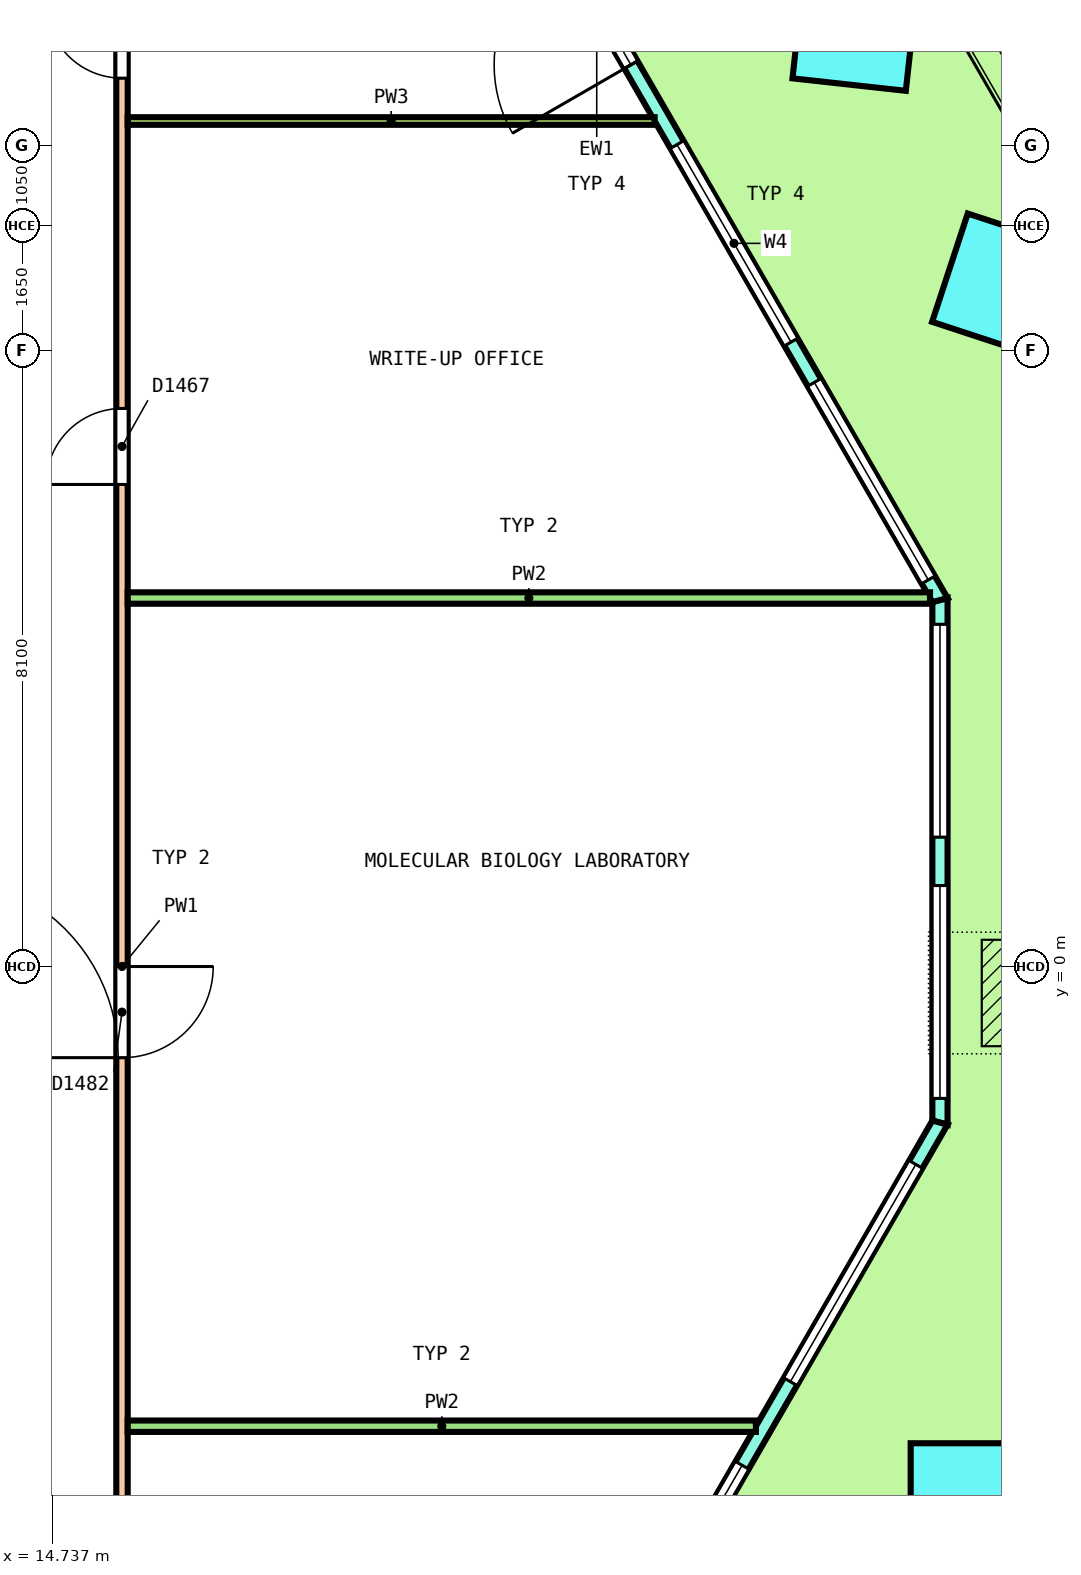
"""IFC4 building model, lengths in metres.
Left out: names, types, materials, properties, quantities, classifications, styles, units other than length and angle.
Written with IfcOpenShell. Run it as: python <this file> out.ifc"""

import sys

from ifc_helpers import new_model, si_unit, direction, frame, frame_2d, origin, origin_2d, place, context, subcontext, project, spatial, polyline, rectangle, outline, extrude, element, fill, save


model = new_model("IFC4")
c1 = context("Model", 3, precision=1e-05, world=origin(), true_north=direction((0.0, 1.0)))
c2 = subcontext(c1, "Body", "Model", "MODEL_VIEW")
j1 = project(units=[si_unit("LENGTHUNIT", "METRE"), si_unit("PLANEANGLEUNIT", "RADIAN")], contexts=[c1])
p1 = place(None, origin())
s1 = spatial("IfcSite", under=j1, at=p1, CompositionType="ELEMENT")
p2 = place(p1, origin())
s2 = spatial("IfcBuilding", under=s1, at=p2, CompositionType="ELEMENT")
p3 = place(p2, frame((0.0, 0.0, 67.4)))
s3 = spatial("IfcBuildingStorey", under=s2, at=p3, CompositionType="ELEMENT", Elevation=67.4)
p4 = place(p3, frame((27.255, 8.959, 0.0), z_axis=(-0.206604255639, -0.238543908815, 0.948900144967), x_axis=(-0.524107453988, 0.845931636481, 0.098544624791)))
e1 = element("IfcColumn", 1, at=p4, inside=s3, PredefinedType="COLUMN", context=c2, shape_type="SweptSolid", body=[
    extrude(rectangle(XDim=1.5, YDim=1.5, at=origin_2d()), origin(), (0.0, 0.0, 1.0), 4.258),
])
p5 = place(p3, frame((25.299, 12.347, 0.0), z_axis=(-0.242216248762, -0.179760869681, 0.953423997268), x_axis=(-0.508552704351, 0.860397321393, 0.033024176556)))
e2 = element("IfcColumn", 2, at=p5, inside=s3, PredefinedType="COLUMN", context=c2, shape_type="SweptSolid", body=[
    extrude(rectangle(XDim=1.5, YDim=1.5, at=origin_2d()), origin(), (0.0, 0.0, 1.0), 4.237),
])
p6 = place(p3, frame((26.776, -7.023, 0.0), z_axis=(-0.106402456539, -0.184226228858, 0.977107575369), x_axis=(0.488665296242, 0.846135593228, 0.212745825157)))
e3 = element("IfcColumn", 3, at=p6, inside=s3, PredefinedType="COLUMN", context=c2, shape_type="SweptSolid", body=[
    extrude(rectangle(XDim=1.5, YDim=1.5, at=origin_2d()), origin(), (0.0, 0.0, 1.0), 4.135),
])
p7 = place(p3, frame((26.411, -2.055, 0.0), z_axis=(0.0, 0.0, 1.0), x_axis=(0.0, 1.0, 0.0)))
e4 = element("IfcWall", 4, at=p7, inside=s3, PredefinedType="SOLIDWALL", context=c2, shape_type="SweptSolid", body=[
    extrude(outline(polyline([(-0.027, -0.1), (1.128, -0.1), (2.283, -0.1), (3.438, -0.1), (4.592, -0.1), (5.747, -0.1), (6.902, -0.1), (6.848, 0.1), (5.711, 0.1), (4.574, 0.1), (3.438, 0.1), (2.301, 0.1), (1.164, 0.1), (0.027, 0.1), (-0.027, -0.1)])), origin(), (0.0, 0.0, 1.0), 4.1),
])
p8 = place(p7, frame((0.319, 0.0, 0.1)))
e5 = element("IfcOpeningElement", 5, at=p8, cuts=e4, PredefinedType="OPENING", context=c2, shape_type="SweptSolid", body=[
    extrude(rectangle(XDim=2.8, YDim=2.9, at=frame_2d((1.4, 1.45))), frame((0.0, 0.11, 0.0), z_axis=(0.0, -1.0, 0.0), x_axis=(1.0, 0.0, 0.0)), (0.0, 0.0, 1.0), 0.22),
])
p9 = place(p7, frame((3.756, 0.0, 0.1)))
e6 = element("IfcOpeningElement", 6, at=p9, cuts=e4, PredefinedType="OPENING", context=c2, shape_type="SweptSolid", body=[
    extrude(rectangle(XDim=2.8, YDim=2.9, at=frame_2d((1.4, 1.45))), frame((0.0, 0.11, 0.0), z_axis=(0.0, -1.0, 0.0), x_axis=(1.0, 0.0, 0.0)), (0.0, 0.0, 1.0), 0.22),
])
p10 = place(p3, frame((26.411, 4.82, 0.0), z_axis=(0.0, 0.0, 1.0), x_axis=(-0.500000137386, 0.866025324465, 0.0)))
e7 = element("IfcWall", 7, at=p10, inside=s3, PredefinedType="SOLIDWALL", context=c2, shape_type="SweptSolid", body=[
    extrude(outline(polyline([(-0.027, -0.1), (0.979, -0.1), (1.986, -0.1), (2.992, -0.1), (3.999, -0.1), (5.005, -0.1), (6.012, -0.1), (7.018, -0.1), (8.025, -0.1), (9.031, -0.1), (10.038, -0.1), (11.044, -0.1), (12.051, -0.1), (13.057, -0.1), (14.063, -0.1), (15.07, -0.1), (16.076, -0.1), (17.083, -0.1), (18.089, -0.1), (18.036, 0.1), (17.035, 0.1), (16.035, 0.1), (15.034, 0.1), (14.034, 0.1), (13.033, 0.1), (12.033, 0.1), (11.032, 0.1), (10.032, 0.1), (9.031, 0.1), (8.031, 0.1), (7.03, 0.1), (6.03, 0.1), (5.029, 0.1), (4.029, 0.1), (3.028, 0.1), (2.028, 0.1), (1.027, 0.1), (0.027, 0.1), (-0.027, -0.1)])), origin(), (0.0, 0.0, 1.0), 4.1),
])
p11 = place(p10, frame((0.306, 0.0, 0.1)))
e8 = element("IfcOpeningElement", 8, at=p11, cuts=e7, PredefinedType="OPENING", context=c2, shape_type="SweptSolid", body=[
    extrude(rectangle(XDim=3.0, YDim=2.9, at=frame_2d((1.5, 1.45))), frame((0.0, 0.11, 0.0), z_axis=(0.0, -1.0, 0.0), x_axis=(1.0, 0.0, 0.0)), (0.0, 0.0, 1.0), 0.22),
])
p12 = place(p10, frame((3.919, 0.0, 0.1)))
e9 = element("IfcOpeningElement", 9, at=p12, cuts=e7, PredefinedType="OPENING", context=c2, shape_type="SweptSolid", body=[
    extrude(rectangle(XDim=3.0, YDim=2.9, at=frame_2d((1.5, 1.45))), frame((0.0, 0.11, 0.0), z_axis=(0.0, -1.0, 0.0), x_axis=(1.0, 0.0, 0.0)), (0.0, 0.0, 1.0), 0.22),
])
p13 = place(p10, frame((8.131, 0.0, 0.0)))
e10 = element("IfcOpeningElement", 10, at=p13, cuts=e7, PredefinedType="OPENING", context=c2, shape_type="SweptSolid", body=[
    extrude(rectangle(XDim=1.8, YDim=2.4, at=frame_2d((0.9, 1.2))), frame((0.0, 0.11, 0.0), z_axis=(0.0, -1.0, 0.0), x_axis=(1.0, 0.0, 0.0)), (0.0, 0.0, 1.0), 0.22),
])
p14 = place(p10, frame((8.131, 0.0, 2.55)))
e11 = element("IfcOpeningElement", 11, at=p14, cuts=e7, PredefinedType="OPENING", context=c2, shape_type="SweptSolid", body=[
    extrude(rectangle(XDim=1.8, YDim=0.45, at=frame_2d((0.9, 0.225))), frame((0.0, 0.11, 0.0), z_axis=(0.0, -1.0, 0.0), x_axis=(1.0, 0.0, 0.0)), (0.0, 0.0, 1.0), 0.22),
])
p15 = place(p10, frame((11.144, 0.0, 0.1)))
e12 = element("IfcOpeningElement", 12, at=p15, cuts=e7, PredefinedType="OPENING", context=c2, shape_type="SweptSolid", body=[
    extrude(rectangle(XDim=3.0, YDim=2.9, at=frame_2d((1.5, 1.45))), frame((0.0, 0.11, 0.0), z_axis=(0.0, -1.0, 0.0), x_axis=(1.0, 0.0, 0.0)), (0.0, 0.0, 1.0), 0.22),
])
p16 = place(p10, frame((14.756, 0.0, 0.1)))
e13 = element("IfcOpeningElement", 13, at=p16, cuts=e7, PredefinedType="OPENING", context=c2, shape_type="SweptSolid", body=[
    extrude(rectangle(XDim=3.0, YDim=2.9, at=frame_2d((1.5, 1.45))), frame((0.0, 0.11, 0.0), z_axis=(0.0, -1.0, 0.0), x_axis=(1.0, 0.0, 0.0)), (0.0, 0.0, 1.0), 0.22),
])
p17 = place(p3, frame((14.985, -21.845, 0.0), z_axis=(0.0, 0.0, 1.0), x_axis=(0.50000204422, 0.86602422355, 0.0)))
e14 = element("IfcWall", 14, at=p17, inside=s3, PredefinedType="SOLIDWALL", context=c2, shape_type="SweptSolid", body=[
    extrude(outline(polyline([(-0.027, -0.1), (1.014, -0.1), (2.055, -0.1), (3.097, -0.1), (4.138, -0.1), (5.179, -0.1), (6.22, -0.1), (7.261, -0.1), (8.303, -0.1), (9.344, -0.1), (10.385, -0.1), (11.426, -0.1), (12.468, -0.1), (13.509, -0.1), (14.55, -0.1), (15.591, -0.1), (16.632, -0.1), (17.673, -0.1), (18.715, -0.1), (19.756, -0.1), (20.797, -0.1), (21.838, -0.1), (22.879, -0.1), (22.826, 0.1), (21.789, 0.1), (20.753, 0.1), (19.717, 0.1), (18.68, 0.1), (17.644, 0.1), (16.608, 0.1), (15.572, 0.1), (14.535, 0.1), (13.499, 0.1), (12.463, 0.1), (11.426, 0.1), (10.39, 0.1), (9.354, 0.1), (8.317, 0.1), (7.281, 0.1), (6.245, 0.1), (5.208, 0.1), (4.172, 0.1), (3.136, 0.1), (2.099, 0.1), (1.063, 0.1), (0.027, 0.1), (-0.027, -0.1)])), origin(), (0.0, 0.0, 1.0), 4.1),
])
p18 = place(p17, frame((0.635, 0.0, 0.1)))
e15 = element("IfcOpeningElement", 15, at=p18, cuts=e14, PredefinedType="OPENING", context=c2, shape_type="SweptSolid", body=[
    extrude(rectangle(XDim=3.3, YDim=2.9, at=frame_2d((1.65, 1.45))), frame((0.0, 0.11, 0.0), z_axis=(0.0, -1.0, 0.0), x_axis=(1.0, 0.0, 0.0)), (0.0, 0.0, 1.0), 0.22),
])
p19 = place(p17, frame((5.206, 0.0, 0.1)))
e16 = element("IfcOpeningElement", 16, at=p19, cuts=e14, PredefinedType="OPENING", context=c2, shape_type="SweptSolid", body=[
    extrude(rectangle(XDim=3.3, YDim=2.9, at=frame_2d((1.65, 1.45))), frame((0.0, 0.11, 0.0), z_axis=(0.0, -1.0, 0.0), x_axis=(1.0, 0.0, 0.0)), (0.0, 0.0, 1.0), 0.22),
])
p20 = place(p17, frame((10.526, 0.0, 0.0)))
e17 = element("IfcOpeningElement", 17, at=p20, cuts=e14, PredefinedType="OPENING", context=c2, shape_type="SweptSolid", body=[
    extrude(rectangle(XDim=1.8, YDim=2.4, at=frame_2d((0.9, 1.2))), frame((0.0, 0.11, 0.0), z_axis=(0.0, -1.0, 0.0), x_axis=(1.0, 0.0, 0.0)), (0.0, 0.0, 1.0), 0.22),
])
p21 = place(p17, frame((10.526, 0.0, 2.55)))
e18 = element("IfcOpeningElement", 18, at=p21, cuts=e14, PredefinedType="OPENING", context=c2, shape_type="SweptSolid", body=[
    extrude(rectangle(XDim=1.8, YDim=0.45, at=frame_2d((0.9, 0.225))), frame((0.0, 0.11, 0.0), z_axis=(0.0, -1.0, 0.0), x_axis=(1.0, 0.0, 0.0)), (0.0, 0.0, 1.0), 0.22),
])
p22 = place(p17, frame((14.347, 0.0, 0.1)))
e19 = element("IfcOpeningElement", 19, at=p22, cuts=e14, PredefinedType="OPENING", context=c2, shape_type="SweptSolid", body=[
    extrude(rectangle(XDim=3.3, YDim=2.9, at=frame_2d((1.65, 1.45))), frame((0.0, 0.11, 0.0), z_axis=(0.0, -1.0, 0.0), x_axis=(1.0, 0.0, 0.0)), (0.0, 0.0, 1.0), 0.22),
])
p23 = place(p17, frame((18.917, 0.0, 0.1)))
e20 = element("IfcOpeningElement", 20, at=p23, cuts=e14, PredefinedType="OPENING", context=c2, shape_type="SweptSolid", body=[
    extrude(rectangle(XDim=3.3, YDim=2.9, at=frame_2d((1.65, 1.45))), frame((0.0, 0.11, 0.0), z_axis=(0.0, -1.0, 0.0), x_axis=(1.0, 0.0, 0.0)), (0.0, 0.0, 1.0), 0.22),
])
p24 = place(p3, frame((15.65, -13.175, 0.0), z_axis=(0.0, 0.0, 1.0), x_axis=(0.0, 1.0, 0.0)))
e21 = element("IfcWall", 21, at=p24, inside=s3, PredefinedType="PARTITIONING", context=c2, shape_type="SweptSolid", body=[
    extrude(rectangle(XDim=26.35, YDim=0.15, at=frame_2d((13.175, 0.0))), origin(), (0.0, 0.0, 1.0), 3.05),
])
p25 = place(p24, frame((19.516, 0.0, 0.0)))
e22 = element("IfcOpeningElement", 22, at=p25, cuts=e21, PredefinedType="OPENING", context=c2, shape_type="SweptSolid", body=[
    extrude(rectangle(XDim=1.0, YDim=2.1, at=frame_2d((0.5, 1.05))), frame((0.0, 0.085, 0.0), z_axis=(0.0, -1.0, 0.0), x_axis=(1.0, 0.0, 0.0)), (0.0, 0.0, 1.0), 0.17),
])
p26 = place(p24, frame((24.861, 0.0, 0.0)))
e23 = element("IfcOpeningElement", 23, at=p26, cuts=e21, PredefinedType="OPENING", context=c2, shape_type="SweptSolid", body=[
    extrude(rectangle(XDim=1.0, YDim=2.1, at=frame_2d((0.5, 1.05))), frame((0.0, 0.085, 0.0), z_axis=(0.0, -1.0, 0.0), x_axis=(1.0, 0.0, 0.0)), (0.0, 0.0, 1.0), 0.17),
])
p27 = place(p24, frame((3.851, 0.0, 0.0)))
e24 = element("IfcOpeningElement", 24, at=p27, cuts=e21, PredefinedType="OPENING", context=c2, shape_type="SweptSolid", body=[
    extrude(rectangle(XDim=1.0, YDim=2.1, at=frame_2d((0.5, 1.05))), frame((0.0, 0.085, 0.0), z_axis=(0.0, -1.0, 0.0), x_axis=(1.0, 0.0, 0.0)), (0.0, 0.0, 1.0), 0.17),
])
p28 = place(p24, frame((11.974, 0.0, 0.0)))
e25 = element("IfcOpeningElement", 25, at=p28, cuts=e21, PredefinedType="OPENING", context=c2, shape_type="SweptSolid", body=[
    extrude(rectangle(XDim=1.2, YDim=2.1, at=frame_2d((0.6, 1.05))), frame((0.0, 0.085, 0.0), z_axis=(0.0, -1.0, 0.0), x_axis=(1.0, 0.0, 0.0)), (0.0, 0.0, 1.0), 0.17),
])
p29 = place(p3, frame((15.725, 4.847, 0.0), z_axis=(0.0, 0.0, 1.0), x_axis=(1.0, 0.0, 0.0)))
e26 = element("IfcWall", 26, at=p29, inside=s3, PredefinedType="PARTITIONING", context=c2, shape_type="SweptSolid", body=[
    extrude(rectangle(XDim=10.555, YDim=0.15, at=frame_2d((5.278, 0.0))), origin(), (0.0, 0.0, 1.0), 3.05),
])
p30 = place(p3, frame((15.725, -6.049, 0.0), z_axis=(0.0, 0.0, 1.0), x_axis=(1.0, 0.0, 0.0)))
e27 = element("IfcWall", 27, at=p30, inside=s3, PredefinedType="PARTITIONING", context=c2, shape_type="SweptSolid", body=[
    extrude(rectangle(XDim=8.264, YDim=0.15, at=frame_2d((4.132, 0.0))), origin(), (0.0, 0.0, 1.0), 3.05),
])
p31 = place(p3, frame((15.725, 11.123, 0.0), z_axis=(0.0, 0.0, 1.0), x_axis=(1.0, 0.0, 0.0)))
e28 = element("IfcWall", 28, at=p31, inside=s3, PredefinedType="PARTITIONING", context=c2, shape_type="SweptSolid", body=[
    extrude(rectangle(XDim=6.932, YDim=0.1, at=frame_2d((3.466, 0.0))), origin(), (0.0, 0.0, 1.0), 3.05),
])
p32 = place(p8, origin())
e29 = element("IfcWindow", 29, at=p32, inside=s3, PartitioningType="SINGLE_PANEL", PredefinedType="WINDOW", context=c2, shape_type="SweptSolid", body=[
    extrude(rectangle(XDim=2.8, YDim=2.9, at=frame_2d((1.4, 1.45))), frame((0.0, 0.03, 0.0), z_axis=(0.0, -1.0, 0.0), x_axis=(1.0, 0.0, 0.0)), (0.0, 0.0, 1.0), 0.06),
])
fill(e5, e29)
p33 = place(p9, origin())
e30 = element("IfcWindow", 30, at=p33, inside=s3, PartitioningType="SINGLE_PANEL", PredefinedType="WINDOW", context=c2, shape_type="SweptSolid", body=[
    extrude(rectangle(XDim=2.8, YDim=2.9, at=frame_2d((1.4, 1.45))), frame((0.0, 0.03, 0.0), z_axis=(0.0, -1.0, 0.0), x_axis=(1.0, 0.0, 0.0)), (0.0, 0.0, 1.0), 0.06),
])
fill(e6, e30)
p34 = place(p11, origin())
e31 = element("IfcWindow", 31, at=p34, inside=s3, PartitioningType="SINGLE_PANEL", PredefinedType="WINDOW", context=c2, shape_type="SweptSolid", body=[
    extrude(rectangle(XDim=3.0, YDim=2.9, at=frame_2d((1.5, 1.45))), frame((0.0, 0.03, 0.0), z_axis=(0.0, -1.0, 0.0), x_axis=(1.0, 0.0, 0.0)), (0.0, 0.0, 1.0), 0.06),
])
fill(e8, e31)
p35 = place(p12, origin())
e32 = element("IfcWindow", 32, at=p35, inside=s3, PartitioningType="SINGLE_PANEL", PredefinedType="WINDOW", context=c2, shape_type="SweptSolid", body=[
    extrude(rectangle(XDim=3.0, YDim=2.9, at=frame_2d((1.5, 1.45))), frame((0.0, 0.03, 0.0), z_axis=(0.0, -1.0, 0.0), x_axis=(1.0, 0.0, 0.0)), (0.0, 0.0, 1.0), 0.06),
])
fill(e9, e32)
p36 = place(p13, origin())
e33 = element("IfcDoor", 33, at=p36, inside=s3, OperationType="DOUBLE_DOOR_SINGLE_SWING", PredefinedType="DOOR", context=c2, shape_type="SweptSolid", body=[
    extrude(rectangle(XDim=1.8, YDim=2.4, at=frame_2d((0.9, 1.2))), frame((0.0, 0.025, 0.0), z_axis=(0.0, -1.0, 0.0), x_axis=(1.0, 0.0, 0.0)), (0.0, 0.0, 1.0), 0.05),
])
fill(e10, e33)
p37 = place(p14, origin())
e34 = element("IfcWindow", 34, at=p37, inside=s3, PartitioningType="SINGLE_PANEL", PredefinedType="WINDOW", context=c2, shape_type="SweptSolid", body=[
    extrude(rectangle(XDim=1.8, YDim=0.45, at=frame_2d((0.9, 0.225))), frame((0.0, 0.03, 0.0), z_axis=(0.0, -1.0, 0.0), x_axis=(1.0, 0.0, 0.0)), (0.0, 0.0, 1.0), 0.06),
])
fill(e11, e34)
p38 = place(p22, origin())
e35 = element("IfcWindow", 35, at=p38, inside=s3, PartitioningType="SINGLE_PANEL", PredefinedType="WINDOW", context=c2, shape_type="SweptSolid", body=[
    extrude(rectangle(XDim=3.3, YDim=2.9, at=frame_2d((1.65, 1.45))), frame((0.0, 0.03, 0.0), z_axis=(0.0, -1.0, 0.0), x_axis=(1.0, 0.0, 0.0)), (0.0, 0.0, 1.0), 0.06),
])
fill(e19, e35)
p39 = place(p23, origin())
e36 = element("IfcWindow", 36, at=p39, inside=s3, PartitioningType="SINGLE_PANEL", PredefinedType="WINDOW", context=c2, shape_type="SweptSolid", body=[
    extrude(rectangle(XDim=3.3, YDim=2.9, at=frame_2d((1.65, 1.45))), frame((0.0, 0.03, 0.0), z_axis=(0.0, -1.0, 0.0), x_axis=(1.0, 0.0, 0.0)), (0.0, 0.0, 1.0), 0.06),
])
fill(e20, e36)
p40 = place(p25, origin())
e37 = element("IfcDoor", 37, at=p40, inside=s3, OperationType="SINGLE_SWING_RIGHT", PredefinedType="DOOR", context=c2, shape_type="SweptSolid", body=[
    extrude(rectangle(XDim=1.0, YDim=2.1, at=frame_2d((0.5, 1.05))), frame((0.0, 0.025, 0.0), z_axis=(0.0, -1.0, 0.0), x_axis=(1.0, 0.0, 0.0)), (0.0, 0.0, 1.0), 0.05),
])
fill(e22, e37)
p41 = place(p26, origin())
e38 = element("IfcDoor", 38, at=p41, inside=s3, OperationType="SINGLE_SWING_LEFT", PredefinedType="DOOR", context=c2, shape_type="SweptSolid", body=[
    extrude(rectangle(XDim=1.0, YDim=2.1, at=frame_2d((0.5, 1.05))), frame((0.0, 0.025, 0.0), z_axis=(0.0, -1.0, 0.0), x_axis=(1.0, 0.0, 0.0)), (0.0, 0.0, 1.0), 0.05),
])
fill(e23, e38)
p42 = place(p28, origin())
e39 = element("IfcDoor", 39, at=p42, inside=s3, OperationType="DOUBLE_DOOR_SINGLE_SWING", PredefinedType="DOOR", context=c2, shape_type="SweptSolid", body=[
    extrude(rectangle(XDim=1.2, YDim=2.1, at=frame_2d((0.6, 1.05))), frame((0.0, 0.025, 0.0), z_axis=(0.0, -1.0, 0.0), x_axis=(1.0, 0.0, 0.0)), (0.0, 0.0, 1.0), 0.05),
])
fill(e25, e39)
save(model, sys.argv[1])
